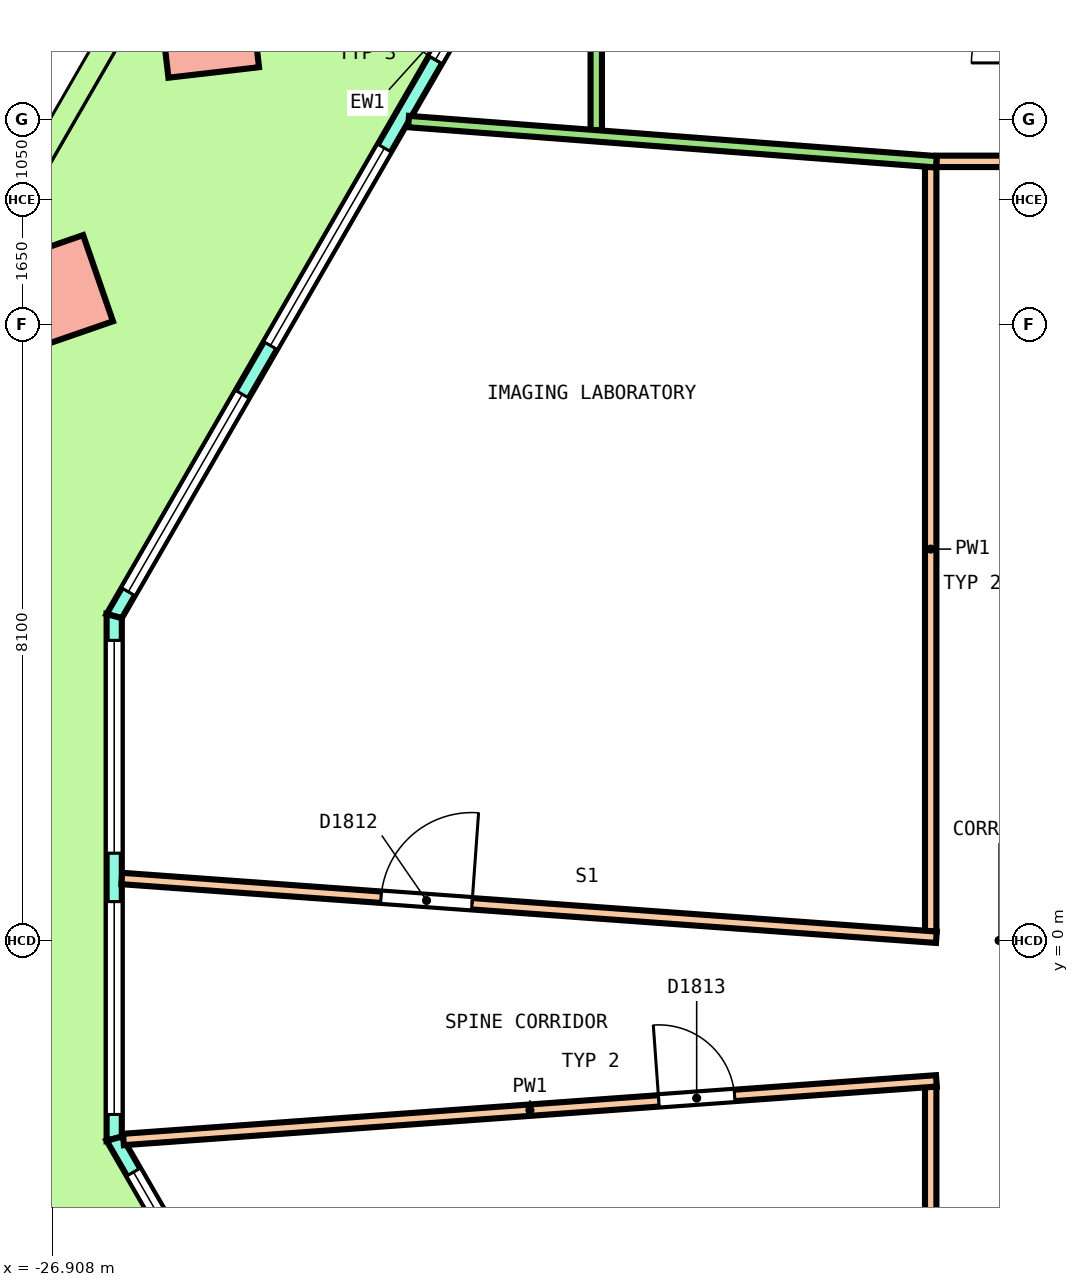
"""IFC4 building model, lengths in metres.
Left out: names, types, materials, properties, quantities, classifications, styles, units other than length and angle.
Written with IfcOpenShell. Run it as: python <this file> out.ifc"""

import sys

from ifc_helpers import new_model, si_unit, direction, frame, frame_2d, origin, origin_2d, place, context, subcontext, project, spatial, polyline, rectangle, outline, extrude, element, fill, save


model = new_model("IFC4")
c1 = context("Model", 3, precision=1e-05, world=origin(), true_north=direction((0.0, 1.0)))
c2 = subcontext(c1, "Body", "Model", "MODEL_VIEW")
j1 = project(units=[si_unit("LENGTHUNIT", "METRE"), si_unit("PLANEANGLEUNIT", "RADIAN")], contexts=[c1])
p1 = place(None, origin())
s1 = spatial("IfcSite", under=j1, at=p1, CompositionType="ELEMENT")
p2 = place(p1, origin())
s2 = spatial("IfcBuilding", under=s1, at=p2, CompositionType="ELEMENT")
p3 = place(p2, frame((0.0, 0.0, 171.6)))
s3 = spatial("IfcBuildingStorey", under=s2, at=p3, CompositionType="ELEMENT", Elevation=171.6)
p4 = place(p3, frame((-24.852, 12.015, 0.0), z_axis=(-0.025367110012, 0.018859632859, 0.999500287133), x_axis=(-0.500321532448, -0.865832038602, 0.003639381657)))
e1 = element("IfcColumn", 1, at=p4, inside=s3, PredefinedType="COLUMN", context=c2, shape_type="SweptSolid", body=[
    extrude(rectangle(XDim=1.2, YDim=1.2, at=origin_2d()), origin(), (0.0, 0.0, 1.0), 4.052),
])
p5 = place(p3, frame((-26.872, 8.516, 0.0), z_axis=(-0.021750699922, 0.025124769716, 0.999447673968), x_axis=(-0.500502376835, -0.865666925982, 0.010869408614)))
e2 = element("IfcColumn", 2, at=p5, inside=s3, PredefinedType="COLUMN", context=c2, shape_type="SweptSolid", body=[
    extrude(rectangle(XDim=1.2, YDim=1.2, at=origin_2d()), origin(), (0.0, 0.0, 1.0), 4.052),
])
p6 = place(p3, frame((-16.741, 20.463, 0.0), z_axis=(0.0, 0.0, 1.0), x_axis=(-0.500003086107, -0.866023622012, 0.0)))
e3 = element("IfcWall", 3, at=p6, inside=s3, PredefinedType="SOLIDWALL", context=c2, shape_type="SweptSolid", body=[
    extrude(outline(polyline([(-0.027, -0.1), (1.015, -0.1), (2.057, -0.1), (3.099, -0.1), (4.141, -0.1), (5.183, -0.1), (6.225, -0.1), (7.267, -0.1), (8.309, -0.1), (9.351, -0.1), (10.393, -0.1), (11.435, -0.1), (12.476, -0.1), (13.518, -0.1), (14.56, -0.1), (15.602, -0.1), (16.644, -0.1), (17.686, -0.1), (18.728, -0.1), (18.674, 0.1), (17.638, 0.1), (16.602, 0.1), (15.566, 0.1), (14.531, 0.1), (13.494, 0.1), (12.458, 0.1), (11.423, 0.1), (10.386, 0.1), (9.351, 0.1), (8.315, 0.1), (7.279, 0.1), (6.243, 0.1), (5.207, 0.1), (4.171, 0.1), (3.135, 0.1), (2.099, 0.1), (1.063, 0.1), (0.027, 0.1), (-0.027, -0.1)])), origin(), (0.0, 0.0, 1.0), 4.1),
])
p7 = place(p6, frame((0.37, 0.0, 0.1)))
e4 = element("IfcOpeningElement", 4, at=p7, cuts=e3, PredefinedType="OPENING", context=c2, shape_type="SweptSolid", body=[
    extrude(rectangle(XDim=3.0, YDim=2.9, at=frame_2d((1.5, 1.45))), frame((0.0, 0.11, 0.0), z_axis=(0.0, -1.0, 0.0), x_axis=(1.0, 0.0, 0.0)), (0.0, 0.0, 1.0), 0.22),
])
p8 = place(p6, frame((4.11, 0.0, 0.1)))
e5 = element("IfcOpeningElement", 5, at=p8, cuts=e3, PredefinedType="OPENING", context=c2, shape_type="SweptSolid", body=[
    extrude(rectangle(XDim=3.0, YDim=2.9, at=frame_2d((1.5, 1.45))), frame((0.0, 0.11, 0.0), z_axis=(0.0, -1.0, 0.0), x_axis=(1.0, 0.0, 0.0)), (0.0, 0.0, 1.0), 0.22),
])
p9 = place(p6, frame((8.451, 0.0, 0.0)))
e6 = element("IfcOpeningElement", 6, at=p9, cuts=e3, PredefinedType="OPENING", context=c2, shape_type="SweptSolid", body=[
    extrude(rectangle(XDim=1.8, YDim=2.4, at=frame_2d((0.9, 1.2))), frame((0.0, 0.11, 0.0), z_axis=(0.0, -1.0, 0.0), x_axis=(1.0, 0.0, 0.0)), (0.0, 0.0, 1.0), 0.22),
])
p10 = place(p6, frame((8.451, 0.0, 2.55)))
e7 = element("IfcOpeningElement", 7, at=p10, cuts=e3, PredefinedType="OPENING", context=c2, shape_type="SweptSolid", body=[
    extrude(rectangle(XDim=1.8, YDim=0.45, at=frame_2d((0.9, 0.225))), frame((0.0, 0.11, 0.0), z_axis=(0.0, -1.0, 0.0), x_axis=(1.0, 0.0, 0.0)), (0.0, 0.0, 1.0), 0.22),
])
p11 = place(p6, frame((11.591, 0.0, 0.1)))
e8 = element("IfcOpeningElement", 8, at=p11, cuts=e3, PredefinedType="OPENING", context=c2, shape_type="SweptSolid", body=[
    extrude(rectangle(XDim=3.0, YDim=2.9, at=frame_2d((1.5, 1.45))), frame((0.0, 0.11, 0.0), z_axis=(0.0, -1.0, 0.0), x_axis=(1.0, 0.0, 0.0)), (0.0, 0.0, 1.0), 0.22),
])
p12 = place(p6, frame((15.331, 0.0, 0.1)))
e9 = element("IfcOpeningElement", 9, at=p12, cuts=e3, PredefinedType="OPENING", context=c2, shape_type="SweptSolid", body=[
    extrude(rectangle(XDim=3.0, YDim=2.9, at=frame_2d((1.5, 1.45))), frame((0.0, 0.11, 0.0), z_axis=(0.0, -1.0, 0.0), x_axis=(1.0, 0.0, 0.0)), (0.0, 0.0, 1.0), 0.22),
])
p13 = place(p3, frame((-26.092, 4.267, 0.0), z_axis=(0.0, 0.0, 1.0), x_axis=(0.0, -1.0, 0.0)))
e10 = element("IfcWall", 10, at=p13, inside=s3, PredefinedType="SOLIDWALL", context=c2, shape_type="SweptSolid", body=[
    extrude(outline(polyline([(-0.027, -0.1), (1.128, -0.1), (2.283, -0.1), (3.438, -0.1), (4.592, -0.1), (5.747, -0.1), (6.902, -0.1), (6.848, 0.1), (5.711, 0.1), (4.574, 0.1), (3.438, 0.1), (2.301, 0.1), (1.164, 0.1), (0.027, 0.1), (-0.027, -0.1)])), origin(), (0.0, 0.0, 1.0), 4.1),
])
p14 = place(p13, frame((0.319, 0.0, 0.1)))
e11 = element("IfcOpeningElement", 11, at=p14, cuts=e10, PredefinedType="OPENING", context=c2, shape_type="SweptSolid", body=[
    extrude(rectangle(XDim=2.8, YDim=2.9, at=frame_2d((1.4, 1.45))), frame((0.0, 0.11, 0.0), z_axis=(0.0, -1.0, 0.0), x_axis=(1.0, 0.0, 0.0)), (0.0, 0.0, 1.0), 0.22),
])
p15 = place(p13, frame((3.756, 0.0, 0.1)))
e12 = element("IfcOpeningElement", 12, at=p15, cuts=e10, PredefinedType="OPENING", context=c2, shape_type="SweptSolid", body=[
    extrude(rectangle(XDim=2.8, YDim=2.9, at=frame_2d((1.4, 1.45))), frame((0.0, 0.11, 0.0), z_axis=(0.0, -1.0, 0.0), x_axis=(1.0, 0.0, 0.0)), (0.0, 0.0, 1.0), 0.22),
])
p16 = place(p3, frame((-26.092, -2.608, 0.0), z_axis=(0.0, 0.0, 1.0), x_axis=(0.500001945179, -0.866024280732, 0.0)))
e13 = element("IfcWall", 13, at=p16, inside=s3, PredefinedType="SOLIDWALL", context=c2, shape_type="SweptSolid", body=[
    extrude(outline(polyline([(-0.027, -0.1), (1.003, -0.1), (2.033, -0.1), (3.063, -0.1), (4.093, -0.1), (5.123, -0.1), (6.153, -0.1), (7.183, -0.1), (8.213, -0.1), (9.243, -0.1), (10.273, -0.1), (11.302, -0.1), (12.333, -0.1), (13.363, -0.1), (14.392, -0.1), (15.422, -0.1), (16.452, -0.1), (17.482, -0.1), (18.512, -0.1), (19.542, -0.1), (20.572, -0.1), (21.602, -0.1), (21.548, 0.1), (20.523, 0.1), (19.499, 0.1), (18.474, 0.1), (17.449, 0.1), (16.424, 0.1), (15.399, 0.1), (14.375, 0.1), (13.35, 0.1), (12.325, 0.1), (11.3, 0.1), (10.275, 0.1), (9.25, 0.1), (8.226, 0.1), (7.201, 0.1), (6.176, 0.1), (5.151, 0.1), (4.126, 0.1), (3.101, 0.1), (2.076, 0.1), (1.052, 0.1), (0.027, 0.1), (-0.027, -0.1)])), origin(), (0.0, 0.0, 1.0), 4.1),
])
p17 = place(p16, frame((0.508, 0.0, 0.1)))
e14 = element("IfcOpeningElement", 14, at=p17, cuts=e13, PredefinedType="OPENING", context=c2, shape_type="SweptSolid", body=[
    extrude(rectangle(XDim=3.3, YDim=2.9, at=frame_2d((1.65, 1.45))), frame((0.0, 0.11, 0.0), z_axis=(0.0, -1.0, 0.0), x_axis=(1.0, 0.0, 0.0)), (0.0, 0.0, 1.0), 0.22),
])
p18 = place(p16, frame((4.823, 0.0, 0.1)))
e15 = element("IfcOpeningElement", 15, at=p18, cuts=e13, PredefinedType="OPENING", context=c2, shape_type="SweptSolid", body=[
    extrude(rectangle(XDim=3.3, YDim=2.9, at=frame_2d((1.65, 1.45))), frame((0.0, 0.11, 0.0), z_axis=(0.0, -1.0, 0.0), x_axis=(1.0, 0.0, 0.0)), (0.0, 0.0, 1.0), 0.22),
])
p19 = place(p16, frame((9.888, 0.0, 0.0)))
e16 = element("IfcOpeningElement", 16, at=p19, cuts=e13, PredefinedType="OPENING", context=c2, shape_type="SweptSolid", body=[
    extrude(rectangle(XDim=1.8, YDim=2.4, at=frame_2d((0.9, 1.2))), frame((0.0, 0.11, 0.0), z_axis=(0.0, -1.0, 0.0), x_axis=(1.0, 0.0, 0.0)), (0.0, 0.0, 1.0), 0.22),
])
p20 = place(p16, frame((9.888, 0.0, 2.55)))
e17 = element("IfcOpeningElement", 17, at=p20, cuts=e13, PredefinedType="OPENING", context=c2, shape_type="SweptSolid", body=[
    extrude(rectangle(XDim=1.8, YDim=0.45, at=frame_2d((0.9, 0.225))), frame((0.0, 0.11, 0.0), z_axis=(0.0, -1.0, 0.0), x_axis=(1.0, 0.0, 0.0)), (0.0, 0.0, 1.0), 0.22),
])
p21 = place(p16, frame((13.453, 0.0, 0.1)))
e18 = element("IfcOpeningElement", 18, at=p21, cuts=e13, PredefinedType="OPENING", context=c2, shape_type="SweptSolid", body=[
    extrude(rectangle(XDim=3.3, YDim=2.9, at=frame_2d((1.65, 1.45))), frame((0.0, 0.11, 0.0), z_axis=(0.0, -1.0, 0.0), x_axis=(1.0, 0.0, 0.0)), (0.0, 0.0, 1.0), 0.22),
])
p22 = place(p16, frame((17.768, 0.0, 0.1)))
e19 = element("IfcOpeningElement", 19, at=p22, cuts=e13, PredefinedType="OPENING", context=c2, shape_type="SweptSolid", body=[
    extrude(rectangle(XDim=3.3, YDim=2.9, at=frame_2d((1.65, 1.45))), frame((0.0, 0.11, 0.0), z_axis=(0.0, -1.0, 0.0), x_axis=(1.0, 0.0, 0.0)), (0.0, 0.0, 1.0), 0.22),
])
p23 = place(p3, frame((-15.275, 10.25, 0.0), z_axis=(0.0, 0.0, 1.0), x_axis=(1.0, 0.0, 0.0)))
e20 = element("IfcWall", 20, at=p23, inside=s3, PredefinedType="PARTITIONING", context=c2, shape_type="SweptSolid", body=[
    extrude(rectangle(XDim=30.55, YDim=0.15, at=frame_2d((15.275, 0.0))), origin(), (0.0, 0.0, 1.0), 3.05),
])
p24 = place(p23, frame((26.638, 0.0, 0.0)))
e21 = element("IfcOpeningElement", 21, at=p24, cuts=e20, PredefinedType="OPENING", context=c2, shape_type="SweptSolid", body=[
    extrude(rectangle(XDim=1.2, YDim=2.1, at=frame_2d((0.6, 1.05))), frame((0.0, 0.085, 0.0), z_axis=(0.0, -1.0, 0.0), x_axis=(1.0, 0.0, 0.0)), (0.0, 0.0, 1.0), 0.17),
])
p25 = place(p23, frame((13.773, 0.0, 0.0)))
e22 = element("IfcOpeningElement", 22, at=p25, cuts=e20, PredefinedType="OPENING", context=c2, shape_type="SweptSolid", body=[
    extrude(rectangle(XDim=1.2, YDim=2.1, at=frame_2d((0.6, 1.05))), frame((0.0, 0.085, 0.0), z_axis=(0.0, -1.0, 0.0), x_axis=(1.0, 0.0, 0.0)), (0.0, 0.0, 1.0), 0.17),
])
p26 = place(p3, frame((-15.35, -10.175, 0.0), z_axis=(0.0, 0.0, 1.0), x_axis=(0.0, 1.0, 0.0)))
e23 = element("IfcWall", 23, at=p26, inside=s3, PredefinedType="PARTITIONING", context=c2, shape_type="SweptSolid", body=[
    extrude(rectangle(XDim=8.248, YDim=0.15, at=frame_2d((4.124, 0.0))), origin(), (0.0, 0.0, 1.0), 3.05),
])
p27 = place(p3, frame((-15.35, 0.123, 0.0), z_axis=(0.0, 0.0, 1.0), x_axis=(0.0, 1.0, 0.0)))
e24 = element("IfcWall", 24, at=p27, inside=s3, PredefinedType="PARTITIONING", context=c2, shape_type="SweptSolid", body=[
    extrude(rectangle(XDim=10.052, YDim=0.15, at=frame_2d((5.026, 0.0))), origin(), (0.0, 0.0, 1.0), 3.05),
])
p28 = place(p3, frame((-25.992, 0.815, 0.0), z_axis=(0.0, 0.0, 1.0), x_axis=(0.997408977035, -0.07193978406, 0.0)))
e25 = element("IfcWall", 25, at=p28, inside=s3, PredefinedType="PARTITIONING", context=c2, shape_type="SweptSolid", body=[
    extrude(rectangle(XDim=10.744, YDim=0.15, at=frame_2d((5.372, 0.0))), origin(), (0.0, 0.0, 1.0), 3.05),
])
p29 = place(p28, frame((3.419, 0.0, 0.0)))
e26 = element("IfcOpeningElement", 26, at=p29, cuts=e25, PredefinedType="OPENING", context=c2, shape_type="SweptSolid", body=[
    extrude(rectangle(XDim=1.2, YDim=2.1, at=frame_2d((0.6, 1.05))), frame((0.0, 0.085, 0.0), z_axis=(0.0, -1.0, 0.0), x_axis=(1.0, 0.0, 0.0)), (0.0, 0.0, 1.0), 0.17),
])
p30 = place(p3, frame((-25.97, -2.618, 0.0), z_axis=(0.0, 0.0, 1.0), x_axis=(0.997408409871, 0.07194764707, 0.0)))
e27 = element("IfcWall", 27, at=p30, inside=s3, PredefinedType="PARTITIONING", context=c2, shape_type="SweptSolid", body=[
    extrude(rectangle(XDim=10.723, YDim=0.15, at=frame_2d((5.361, 0.0))), origin(), (0.0, 0.0, 1.0), 3.05),
])
p31 = place(p30, frame((7.061, 0.0, 0.0)))
e28 = element("IfcOpeningElement", 28, at=p31, cuts=e27, PredefinedType="OPENING", context=c2, shape_type="SweptSolid", body=[
    extrude(rectangle(XDim=1.0, YDim=2.1, at=frame_2d((0.5, 1.05))), frame((0.0, 0.085, 0.0), z_axis=(0.0, -1.0, 0.0), x_axis=(1.0, 0.0, 0.0)), (0.0, 0.0, 1.0), 0.17),
])
p32 = place(p3, frame((-19.75, 10.66, 0.0), z_axis=(0.0, 0.0, 1.0), x_axis=(0.0, 1.0, 0.0)))
e29 = element("IfcWall", 29, at=p32, inside=s3, PredefinedType="PARTITIONING", context=c2, shape_type="SweptSolid", body=[
    extrude(rectangle(XDim=4.065, YDim=0.15, at=frame_2d((2.032, 0.0))), origin(), (0.0, 0.0, 1.0), 3.05),
])
p33 = place(p3, frame((-22.219, 10.774, 0.0), z_axis=(0.0, 0.0, 1.0), x_axis=(0.997107855609, -0.075999501862, 0.0)))
e30 = element("IfcWall", 30, at=p33, inside=s3, PredefinedType="PARTITIONING", context=c2, shape_type="SweptSolid", body=[
    extrude(rectangle(XDim=6.965, YDim=0.15, at=frame_2d((3.482, 0.0))), origin(), (0.0, 0.0, 1.0), 3.05),
])
p34 = place(p9, origin())
e31 = element("IfcDoor", 31, at=p34, inside=s3, OperationType="DOUBLE_DOOR_SINGLE_SWING", PredefinedType="DOOR", context=c2, shape_type="SweptSolid", body=[
    extrude(rectangle(XDim=1.8, YDim=2.4, at=frame_2d((0.9, 1.2))), frame((0.0, 0.025, 0.0), z_axis=(0.0, -1.0, 0.0), x_axis=(1.0, 0.0, 0.0)), (0.0, 0.0, 1.0), 0.05),
])
fill(e6, e31)
p35 = place(p10, origin())
e32 = element("IfcWindow", 32, at=p35, inside=s3, PartitioningType="SINGLE_PANEL", PredefinedType="WINDOW", context=c2, shape_type="SweptSolid", body=[
    extrude(rectangle(XDim=1.8, YDim=0.45, at=frame_2d((0.9, 0.225))), frame((0.0, 0.03, 0.0), z_axis=(0.0, -1.0, 0.0), x_axis=(1.0, 0.0, 0.0)), (0.0, 0.0, 1.0), 0.06),
])
fill(e7, e32)
p36 = place(p11, origin())
e33 = element("IfcWindow", 33, at=p36, inside=s3, PartitioningType="SINGLE_PANEL", PredefinedType="WINDOW", context=c2, shape_type="SweptSolid", body=[
    extrude(rectangle(XDim=3.0, YDim=2.9, at=frame_2d((1.5, 1.45))), frame((0.0, 0.03, 0.0), z_axis=(0.0, -1.0, 0.0), x_axis=(1.0, 0.0, 0.0)), (0.0, 0.0, 1.0), 0.06),
])
fill(e8, e33)
p37 = place(p12, origin())
e34 = element("IfcWindow", 34, at=p37, inside=s3, PartitioningType="SINGLE_PANEL", PredefinedType="WINDOW", context=c2, shape_type="SweptSolid", body=[
    extrude(rectangle(XDim=3.0, YDim=2.9, at=frame_2d((1.5, 1.45))), frame((0.0, 0.03, 0.0), z_axis=(0.0, -1.0, 0.0), x_axis=(1.0, 0.0, 0.0)), (0.0, 0.0, 1.0), 0.06),
])
fill(e9, e34)
p38 = place(p14, origin())
e35 = element("IfcWindow", 35, at=p38, inside=s3, PartitioningType="SINGLE_PANEL", PredefinedType="WINDOW", context=c2, shape_type="SweptSolid", body=[
    extrude(rectangle(XDim=2.8, YDim=2.9, at=frame_2d((1.4, 1.45))), frame((0.0, 0.03, 0.0), z_axis=(0.0, -1.0, 0.0), x_axis=(1.0, 0.0, 0.0)), (0.0, 0.0, 1.0), 0.06),
])
fill(e11, e35)
p39 = place(p15, origin())
e36 = element("IfcWindow", 36, at=p39, inside=s3, PartitioningType="SINGLE_PANEL", PredefinedType="WINDOW", context=c2, shape_type="SweptSolid", body=[
    extrude(rectangle(XDim=2.8, YDim=2.9, at=frame_2d((1.4, 1.45))), frame((0.0, 0.03, 0.0), z_axis=(0.0, -1.0, 0.0), x_axis=(1.0, 0.0, 0.0)), (0.0, 0.0, 1.0), 0.06),
])
fill(e12, e36)
p40 = place(p17, origin())
e37 = element("IfcWindow", 37, at=p40, inside=s3, PartitioningType="SINGLE_PANEL", PredefinedType="WINDOW", context=c2, shape_type="SweptSolid", body=[
    extrude(rectangle(XDim=3.3, YDim=2.9, at=frame_2d((1.65, 1.45))), frame((0.0, 0.03, 0.0), z_axis=(0.0, -1.0, 0.0), x_axis=(1.0, 0.0, 0.0)), (0.0, 0.0, 1.0), 0.06),
])
fill(e14, e37)
p41 = place(p29, origin())
e38 = element("IfcDoor", 38, at=p41, inside=s3, OperationType="DOUBLE_DOOR_SINGLE_SWING", PredefinedType="DOOR", context=c2, shape_type="SweptSolid", body=[
    extrude(rectangle(XDim=1.2, YDim=2.1, at=frame_2d((0.6, 1.05))), frame((0.0, 0.025, 0.0), z_axis=(0.0, -1.0, 0.0), x_axis=(1.0, 0.0, 0.0)), (0.0, 0.0, 1.0), 0.05),
])
fill(e26, e38)
p42 = place(p31, origin())
e39 = element("IfcDoor", 39, at=p42, inside=s3, OperationType="SINGLE_SWING_LEFT", PredefinedType="DOOR", context=c2, shape_type="SweptSolid", body=[
    extrude(rectangle(XDim=1.0, YDim=2.1, at=frame_2d((0.5, 1.05))), frame((0.0, 0.025, 0.0), z_axis=(0.0, -1.0, 0.0), x_axis=(1.0, 0.0, 0.0)), (0.0, 0.0, 1.0), 0.05),
])
fill(e28, e39)
save(model, sys.argv[1])
